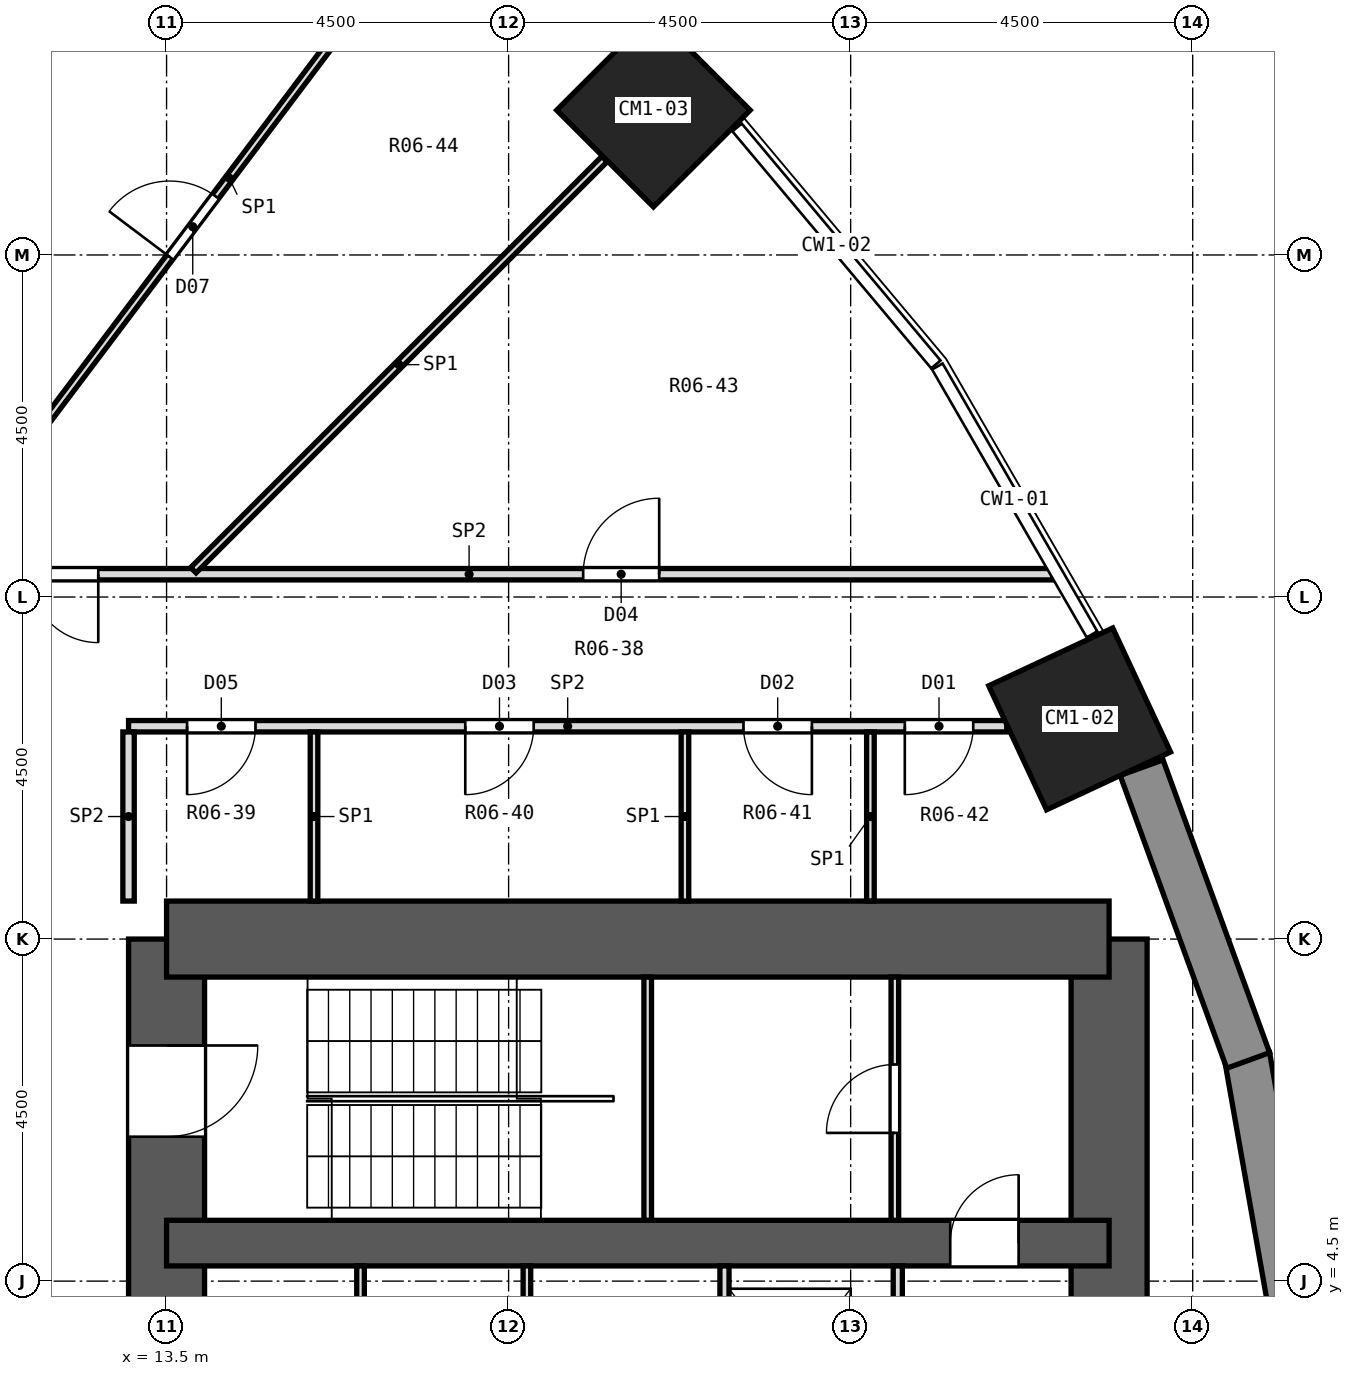
"""IFC4 building model, lengths in metres.
Left out: names, types, materials, properties, quantities, classifications, styles, units other than length and angle.
Written with IfcOpenShell. Run it as: python <this file> out.ifc"""

import sys

from ifc_helpers import new_model, si_unit, direction, frame, frame_2d, origin, origin_2d, place, context, subcontext, project, spatial, rectangle, extrude, element, fill, save


model = new_model("IFC4")
c1 = context("Model", 3, precision=1e-05, world=origin(), true_north=direction((0.0, 1.0)))
c2 = subcontext(c1, "Body", "Model", "MODEL_VIEW")
j1 = project(units=[si_unit("LENGTHUNIT", "METRE"), si_unit("PLANEANGLEUNIT", "RADIAN")], contexts=[c1])
p1 = place(None, origin())
s1 = spatial("IfcSite", under=j1, at=p1, CompositionType="ELEMENT")
p2 = place(p1, origin())
s2 = spatial("IfcBuilding", under=s1, at=p2, CompositionType="ELEMENT")
p3 = place(p2, frame((0.0, 0.0, 13.4)))
s3 = spatial("IfcBuildingStorey", under=s2, at=p3, CompositionType="ELEMENT", Elevation=13.4)
for number, where, z_axis, x_axis in (
    (1, (25.512, 11.897, 0.0), (0.0, 0.0, 1.0), (0.906, 0.423, 0.0)),
    (2, (19.905, 19.905, 0.0), (0.0, 0.0, 1.0), (0.707, 0.707, 0.0)),
):
    element("IfcColumn", number, at=place(p3, frame(where, z_axis=z_axis, x_axis=x_axis)), inside=s3, PredefinedType="COLUMN", context=c2, shape_type="SweptSolid", body=[
        extrude(rectangle(XDim=1.8, YDim=1.8, at=origin_2d()), origin(), (0.0, 0.0, 1.0), 4.2),
    ])
p4 = place(p3, frame((13.5, -9.0, 0.0), z_axis=(0.0, 0.0, 1.0), x_axis=(0.0, 1.0, 0.0)))
e3 = element("IfcWall", 3, at=p4, inside=s3, PredefinedType="SHEAR", context=c2, shape_type="SweptSolid", body=[
    extrude(rectangle(XDim=18.0, YDim=1.0, at=frame_2d((9.0, 0.0))), origin(), (0.0, 0.0, 1.0), 4.2),
])
p5 = place(p4, frame((15.4, 0.0, 0.0)))
e4 = element("IfcOpeningElement", 4, at=p5, cuts=e3, PredefinedType="OPENING", context=c2, shape_type="SweptSolid", body=[
    extrude(rectangle(XDim=1.2, YDim=2.1, at=frame_2d((0.6, 1.05))), frame((0.0, 0.512, 0.0), z_axis=(0.0, -1.0, 0.0), x_axis=(1.0, 0.0, 0.0)), (0.0, 0.0, 1.0), 1.024),
])
p6 = place(p4, frame((1.4, 0.0, 0.0)))
e5 = element("IfcOpeningElement", 5, at=p6, cuts=e3, PredefinedType="OPENING", context=c2, shape_type="SweptSolid", body=[
    extrude(rectangle(XDim=1.2, YDim=2.1, at=frame_2d((0.6, 1.05))), frame((0.0, 0.512, 0.0), z_axis=(0.0, -1.0, 0.0), x_axis=(1.0, 0.0, 0.0)), (0.0, 0.0, 1.0), 1.024),
])
p7 = place(p4, frame((7.5, 0.0, 0.0)))
e6 = element("IfcOpeningElement", 6, at=p7, cuts=e3, PredefinedType="OPENING", context=c2, shape_type="SweptSolid", body=[
    extrude(rectangle(XDim=3.0, YDim=2.4, at=frame_2d((1.5, 1.2))), frame((0.0, 0.512, 0.0), z_axis=(0.0, -1.0, 0.0), x_axis=(1.0, 0.0, 0.0)), (0.0, 0.0, 1.0), 1.024),
])
p8 = place(p3, frame((25.9, -9.0, 0.0), z_axis=(0.0, 0.0, 1.0), x_axis=(0.0, 1.0, 0.0)))
e7 = element("IfcWall", 7, at=p8, inside=s3, PredefinedType="SHEAR", context=c2, shape_type="SweptSolid", body=[
    extrude(rectangle(XDim=18.0, YDim=1.0, at=frame_2d((9.0, 0.0))), origin(), (0.0, 0.0, 1.0), 4.2),
])
p9 = place(p3, frame((13.5, 9.0, 0.0), z_axis=(0.0, 0.0, 1.0), x_axis=(1.0, 0.0, 0.0)))
e8 = element("IfcWall", 8, at=p9, inside=s3, PredefinedType="SHEAR", context=c2, shape_type="SweptSolid", body=[
    extrude(rectangle(XDim=12.4, YDim=1.0, at=frame_2d((6.2, 0.0))), origin(), (0.0, 0.0, 1.0), 4.2),
])
p10 = place(p3, frame((13.5, 5.0, 0.0), z_axis=(0.0, 0.0, 1.0), x_axis=(1.0, 0.0, 0.0)))
e9 = element("IfcWall", 9, at=p10, inside=s3, PredefinedType="SHEAR", context=c2, shape_type="SweptSolid", body=[
    extrude(rectangle(XDim=12.4, YDim=0.6, at=frame_2d((6.2, 0.0))), origin(), (0.0, 0.0, 1.0), 4.2),
])
p11 = place(p10, frame((10.31, 0.0, 0.0)))
e10 = element("IfcOpeningElement", 10, at=p11, cuts=e9, PredefinedType="OPENING", context=c2, shape_type="SweptSolid", body=[
    extrude(rectangle(XDim=0.9, YDim=2.1, at=frame_2d((0.45, 1.05))), frame((0.0, 0.312, 0.0), z_axis=(0.0, -1.0, 0.0), x_axis=(1.0, 0.0, 0.0)), (0.0, 0.0, 1.0), 0.624),
])
p12 = place(p3, frame((28.428, 3.417, 0.0), z_axis=(0.0, 0.0, 1.0), x_axis=(-0.173673210505, 0.984803338719, 0.0)))
e11 = element("IfcWall", 11, at=p12, inside=s3, PredefinedType="SOLIDWALL", context=c2, shape_type="SweptSolid", body=[
    extrude(rectangle(XDim=4.099, YDim=0.6, at=frame_2d((2.05, 0.0))), origin(), (0.0, 0.0, 1.0), 3.65),
])
p13 = place(p3, frame((27.73, 7.403, 0.0), z_axis=(0.0, 0.0, 1.0), x_axis=(-0.342034744565, 0.939687306241, 0.0)))
e12 = element("IfcWall", 12, at=p13, inside=s3, PredefinedType="SOLIDWALL", context=c2, shape_type="SweptSolid", body=[
    extrude(rectangle(XDim=4.099, YDim=0.6, at=frame_2d((2.05, 0.0))), origin(), (0.0, 0.0, 1.0), 3.65),
])
p14 = place(p3, frame((13.0, 11.8, 0.0), z_axis=(0.0, 0.0, 1.0), x_axis=(1.0, 0.0, 0.0)))
e13 = element("IfcWall", 13, at=p14, inside=s3, PredefinedType="PARTITIONING", context=c2, shape_type="SweptSolid", body=[
    extrude(rectangle(XDim=11.554, YDim=0.15, at=frame_2d((5.777, 0.0))), origin(), (0.0, 0.0, 1.0), 3.65),
])
p15 = place(p14, frame((10.212, 0.0, 0.0)))
e14 = element("IfcOpeningElement", 14, at=p15, cuts=e13, PredefinedType="OPENING", context=c2, shape_type="SweptSolid", body=[
    extrude(rectangle(XDim=0.9, YDim=2.1, at=frame_2d((0.45, 1.05))), frame((0.0, 0.087, 0.0), z_axis=(0.0, -1.0, 0.0), x_axis=(1.0, 0.0, 0.0)), (0.0, 0.0, 1.0), 0.174),
])
p16 = place(p14, frame((8.09, 0.0, 0.0)))
e15 = element("IfcOpeningElement", 15, at=p16, cuts=e13, PredefinedType="OPENING", context=c2, shape_type="SweptSolid", body=[
    extrude(rectangle(XDim=0.9, YDim=2.1, at=frame_2d((0.45, 1.05))), frame((0.0, 0.087, 0.0), z_axis=(0.0, -1.0, 0.0), x_axis=(1.0, 0.0, 0.0)), (0.0, 0.0, 1.0), 0.174),
])
p17 = place(p14, frame((4.43, 0.0, 0.0)))
e16 = element("IfcOpeningElement", 16, at=p17, cuts=e13, PredefinedType="OPENING", context=c2, shape_type="SweptSolid", body=[
    extrude(rectangle(XDim=0.9, YDim=2.1, at=frame_2d((0.45, 1.05))), frame((0.0, 0.087, 0.0), z_axis=(0.0, -1.0, 0.0), x_axis=(1.0, 0.0, 0.0)), (0.0, 0.0, 1.0), 0.174),
])
p18 = place(p14, frame((0.77, 0.0, 0.0)))
e17 = element("IfcOpeningElement", 17, at=p18, cuts=e13, PredefinedType="OPENING", context=c2, shape_type="SweptSolid", body=[
    extrude(rectangle(XDim=0.9, YDim=2.1, at=frame_2d((0.45, 1.05))), frame((0.0, 0.087, 0.0), z_axis=(0.0, -1.0, 0.0), x_axis=(1.0, 0.0, 0.0)), (0.0, 0.0, 1.0), 0.174),
])
p19 = place(p3, frame((9.8, 13.8, 0.0), z_axis=(0.0, 0.0, 1.0), x_axis=(1.0, 0.0, 0.0)))
e18 = element("IfcWall", 18, at=p19, inside=s3, PredefinedType="PARTITIONING", context=c2, shape_type="SweptSolid", body=[
    extrude(rectangle(XDim=15.36, YDim=0.15, at=frame_2d((7.68, 0.0))), origin(), (0.0, 0.0, 1.0), 3.65),
])
p20 = place(p19, frame((9.181, 0.0, 0.0)))
e19 = element("IfcOpeningElement", 19, at=p20, cuts=e18, PredefinedType="OPENING", context=c2, shape_type="SweptSolid", body=[
    extrude(rectangle(XDim=1.0, YDim=2.1, at=frame_2d((0.5, 1.05))), frame((0.0, 0.087, 0.0), z_axis=(0.0, -1.0, 0.0), x_axis=(1.0, 0.0, 0.0)), (0.0, 0.0, 1.0), 0.174),
])
p21 = place(p19, frame((1.001, 0.0, 0.0)))
e20 = element("IfcOpeningElement", 20, at=p21, cuts=e18, PredefinedType="OPENING", context=c2, shape_type="SweptSolid", body=[
    extrude(rectangle(XDim=1.8, YDim=2.1, at=frame_2d((0.9, 1.05))), frame((0.0, 0.087, 0.0), z_axis=(0.0, -1.0, 0.0), x_axis=(1.0, 0.0, 0.0)), (0.0, 0.0, 1.0), 0.174),
])
p22 = place(p3, frame((13.853, 13.853, 0.0), z_axis=(0.0, 0.0, 1.0), x_axis=(0.707106781187, 0.707106781187, 0.0)))
e21 = element("IfcWall", 21, at=p22, inside=s3, PredefinedType="PARTITIONING", context=c2, shape_type="SweptSolid", body=[
    extrude(rectangle(XDim=7.649, YDim=0.1, at=frame_2d((3.824, 0.0))), origin(), (0.0, 0.0, 1.0), 3.65),
])
p23 = place(p3, frame((10.444, 13.86, 0.0), z_axis=(0.0, 0.0, 1.0), x_axis=(0.601842502347, 0.798614802248, 0.0)))
e22 = element("IfcWall", 22, at=p23, inside=s3, PredefinedType="PARTITIONING", context=c2, shape_type="SweptSolid", body=[
    extrude(rectangle(XDim=11.375, YDim=0.1, at=frame_2d((5.688, 0.0))), origin(), (0.0, 0.0, 1.0), 3.65),
])
p24 = place(p23, frame((5.15, 0.0, 0.0)))
e23 = element("IfcOpeningElement", 23, at=p24, cuts=e22, PredefinedType="OPENING", context=c2, shape_type="SweptSolid", body=[
    extrude(rectangle(XDim=1.0, YDim=2.1, at=frame_2d((0.5, 1.05))), frame((0.0, 0.062, 0.0), z_axis=(0.0, -1.0, 0.0), x_axis=(1.0, 0.0, 0.0)), (0.0, 0.0, 1.0), 0.124),
])
for number, where, z_axis, x_axis in (
    (24, (22.76, 9.5, 0.0), (0.0, 0.0, 1.0), (0.0, 1.0, 0.0)),
    (25, (20.32, 9.5, 0.0), (0.0, 0.0, 1.0), (0.0, 1.0, 0.0)),
    (26, (15.44, 9.5, 0.0), (0.0, 0.0, 1.0), (0.0, 1.0, 0.0)),
):
    element("IfcWall", number, at=place(p3, frame(where, z_axis=z_axis, x_axis=x_axis)), inside=s3, PredefinedType="PARTITIONING", context=c2, shape_type="SweptSolid", body=[
        extrude(rectangle(XDim=2.225, YDim=0.1, at=frame_2d((1.113, 0.0))), origin(), (0.0, 0.0, 1.0), 3.65),
    ])
p25 = place(p3, frame((13.0, 9.5, 0.0), z_axis=(0.0, 0.0, 1.0), x_axis=(0.0, 1.0, 0.0)))
e27 = element("IfcWall", 27, at=p25, inside=s3, PredefinedType="PARTITIONING", context=c2, shape_type="SweptSolid", body=[
    extrude(rectangle(XDim=2.225, YDim=0.15, at=frame_2d((1.113, 0.0))), origin(), (0.0, 0.0, 1.0), 3.65),
])
for number, where, z_axis, x_axis in (
    (28, (16.052, 2.3, 0.0), (0.0, 0.0, 1.0), (0.0, 1.0, 0.0)),
    (29, (18.241, 2.3, 0.0), (0.0, 0.0, 1.0), (0.0, 1.0, 0.0)),
):
    element("IfcWall", number, at=place(p3, frame(where, z_axis=z_axis, x_axis=x_axis)), inside=s3, PredefinedType="PARTITIONING", context=c2, shape_type="SweptSolid", body=[
        extrude(rectangle(XDim=2.4, YDim=0.1, at=frame_2d((1.2, 0.0))), origin(), (0.0, 0.0, 1.0), 3.65),
    ])
for number, where, z_axis, x_axis in (
    (30, (20.84, 2.3, 0.0), (0.0, 0.0, 1.0), (0.0, 1.0, 0.0)),
    (31, (23.12, 2.3, 0.0), (0.0, 0.0, 1.0), (0.0, 1.0, 0.0)),
):
    element("IfcWall", number, at=place(p3, frame(where, z_axis=z_axis, x_axis=x_axis)), inside=s3, PredefinedType="PARTITIONING", context=c2, shape_type="SweptSolid", body=[
        extrude(rectangle(XDim=2.4, YDim=0.12, at=frame_2d((1.2, 0.0))), origin(), (0.0, 0.0, 1.0), 3.65),
    ])
p26 = place(p3, frame((19.83, 5.3, 0.0), z_axis=(0.0, 0.0, 1.0), x_axis=(0.0, 1.0, 0.0)))
e32 = element("IfcWall", 32, at=p26, inside=s3, PredefinedType="PARTITIONING", context=c2, shape_type="SweptSolid", body=[
    extrude(rectangle(XDim=3.2, YDim=0.1, at=frame_2d((1.6, 0.0))), origin(), (0.0, 0.0, 1.0), 3.65),
])
p27 = place(p3, frame((23.082, 5.3, 0.0), z_axis=(0.0, 0.0, 1.0), x_axis=(0.0, 1.0, 0.0)))
e33 = element("IfcWall", 33, at=p27, inside=s3, PredefinedType="PARTITIONING", context=c2, shape_type="SweptSolid", body=[
    extrude(rectangle(XDim=3.2, YDim=0.1, at=frame_2d((1.6, 0.0))), origin(), (0.0, 0.0, 1.0), 3.65),
])
p28 = place(p27, frame((1.15, 0.0, 0.0)))
e34 = element("IfcOpeningElement", 34, at=p28, cuts=e33, PredefinedType="OPENING", context=c2, shape_type="SweptSolid", body=[
    extrude(rectangle(XDim=0.9, YDim=2.1, at=frame_2d((0.45, 1.05))), frame((0.0, 0.062, 0.0), z_axis=(0.0, -1.0, 0.0), x_axis=(1.0, 0.0, 0.0)), (0.0, 0.0, 1.0), 0.124),
])
p29 = place(p15, frame((0.9, 0.0, 0.0), z_axis=(0.0, 0.0, 1.0), x_axis=(-1.0, 0.0, 0.0)))
e35 = element("IfcDoor", 35, at=p29, inside=s3, OperationType="SINGLE_SWING_RIGHT", PredefinedType="DOOR", context=c2, shape_type="SweptSolid", body=[
    extrude(rectangle(XDim=0.9, YDim=2.1, at=frame_2d((0.45, 1.05))), frame((0.0, 0.025, 0.0), z_axis=(0.0, -1.0, 0.0), x_axis=(1.0, 0.0, 0.0)), (0.0, 0.0, 1.0), 0.05),
])
fill(e14, e35)
p30 = place(p16, frame((0.9, 0.0, 0.0), z_axis=(0.0, 0.0, 1.0), x_axis=(-1.0, 0.0, 0.0)))
e36 = element("IfcDoor", 36, at=p30, inside=s3, OperationType="SINGLE_SWING_LEFT", PredefinedType="DOOR", context=c2, shape_type="SweptSolid", body=[
    extrude(rectangle(XDim=0.9, YDim=2.1, at=frame_2d((0.45, 1.05))), frame((0.0, 0.025, 0.0), z_axis=(0.0, -1.0, 0.0), x_axis=(1.0, 0.0, 0.0)), (0.0, 0.0, 1.0), 0.05),
])
fill(e15, e36)
p31 = place(p17, frame((0.9, 0.0, 0.0), z_axis=(0.0, 0.0, 1.0), x_axis=(-1.0, 0.0, 0.0)))
e37 = element("IfcDoor", 37, at=p31, inside=s3, OperationType="SINGLE_SWING_RIGHT", PredefinedType="DOOR", context=c2, shape_type="SweptSolid", body=[
    extrude(rectangle(XDim=0.9, YDim=2.1, at=frame_2d((0.45, 1.05))), frame((0.0, 0.025, 0.0), z_axis=(0.0, -1.0, 0.0), x_axis=(1.0, 0.0, 0.0)), (0.0, 0.0, 1.0), 0.05),
])
fill(e16, e37)
p32 = place(p20, origin())
e38 = element("IfcDoor", 38, at=p32, inside=s3, OperationType="SINGLE_SWING_RIGHT", PredefinedType="DOOR", context=c2, shape_type="SweptSolid", body=[
    extrude(rectangle(XDim=1.0, YDim=2.1, at=frame_2d((0.5, 1.05))), frame((0.0, 0.025, 0.0), z_axis=(0.0, -1.0, 0.0), x_axis=(1.0, 0.0, 0.0)), (0.0, 0.0, 1.0), 0.05),
])
fill(e19, e38)
p33 = place(p18, frame((0.9, 0.0, 0.0), z_axis=(0.0, 0.0, 1.0), x_axis=(-1.0, 0.0, 0.0)))
e39 = element("IfcDoor", 39, at=p33, inside=s3, OperationType="SINGLE_SWING_RIGHT", PredefinedType="DOOR", context=c2, shape_type="SweptSolid", body=[
    extrude(rectangle(XDim=0.9, YDim=2.1, at=frame_2d((0.45, 1.05))), frame((0.0, 0.025, 0.0), z_axis=(0.0, -1.0, 0.0), x_axis=(1.0, 0.0, 0.0)), (0.0, 0.0, 1.0), 0.05),
])
fill(e17, e39)
p34 = place(p21, frame((1.8, 0.0, 0.0), z_axis=(0.0, 0.0, 1.0), x_axis=(-1.0, 0.0, 0.0)))
e40 = element("IfcDoor", 40, at=p34, inside=s3, OperationType="DOUBLE_DOOR_SINGLE_SWING", PredefinedType="DOOR", context=c2, shape_type="SweptSolid", body=[
    extrude(rectangle(XDim=1.8, YDim=2.1, at=frame_2d((0.9, 1.05))), frame((0.0, 0.025, 0.0), z_axis=(0.0, -1.0, 0.0), x_axis=(1.0, 0.0, 0.0)), (0.0, 0.0, 1.0), 0.05),
])
fill(e20, e40)
p35 = place(p24, origin())
e41 = element("IfcDoor", 41, at=p35, inside=s3, OperationType="SINGLE_SWING_LEFT", PredefinedType="DOOR", context=c2, shape_type="SweptSolid", body=[
    extrude(rectangle(XDim=1.0, YDim=2.1, at=frame_2d((0.5, 1.05))), frame((0.0, 0.025, 0.0), z_axis=(0.0, -1.0, 0.0), x_axis=(1.0, 0.0, 0.0)), (0.0, 0.0, 1.0), 0.05),
])
fill(e23, e41)
p36 = place(p28, origin())
e42 = element("IfcDoor", 42, at=p36, inside=s3, OperationType="SINGLE_SWING_LEFT", PredefinedType="DOOR", context=c2, shape_type="SweptSolid", body=[
    extrude(rectangle(XDim=0.9, YDim=2.1, at=frame_2d((0.45, 1.05))), frame((0.0, 0.025, 0.0), z_axis=(0.0, -1.0, 0.0), x_axis=(1.0, 0.0, 0.0)), (0.0, 0.0, 1.0), 0.05),
])
fill(e34, e42)
p37 = place(p11, origin())
e43 = element("IfcDoor", 43, at=p37, inside=s3, OperationType="SINGLE_SWING_RIGHT", PredefinedType="DOOR", context=c2, shape_type="SweptSolid", body=[
    extrude(rectangle(XDim=0.9, YDim=2.1, at=frame_2d((0.45, 1.05))), frame((0.0, 0.025, 0.0), z_axis=(0.0, -1.0, 0.0), x_axis=(1.0, 0.0, 0.0)), (0.0, 0.0, 1.0), 0.05),
])
fill(e10, e43)
p38 = place(p5, frame((1.2, 0.0, 0.0), z_axis=(0.0, 0.0, 1.0), x_axis=(-1.0, 0.0, 0.0)))
e44 = element("IfcDoor", 44, at=p38, inside=s3, OperationType="SINGLE_SWING_LEFT", PredefinedType="DOOR", context=c2, shape_type="SweptSolid", body=[
    extrude(rectangle(XDim=1.2, YDim=2.1, at=frame_2d((0.6, 1.05))), frame((0.0, 0.025, 0.0), z_axis=(0.0, -1.0, 0.0), x_axis=(1.0, 0.0, 0.0)), (0.0, 0.0, 1.0), 0.05),
])
fill(e4, e44)
save(model, sys.argv[1])
